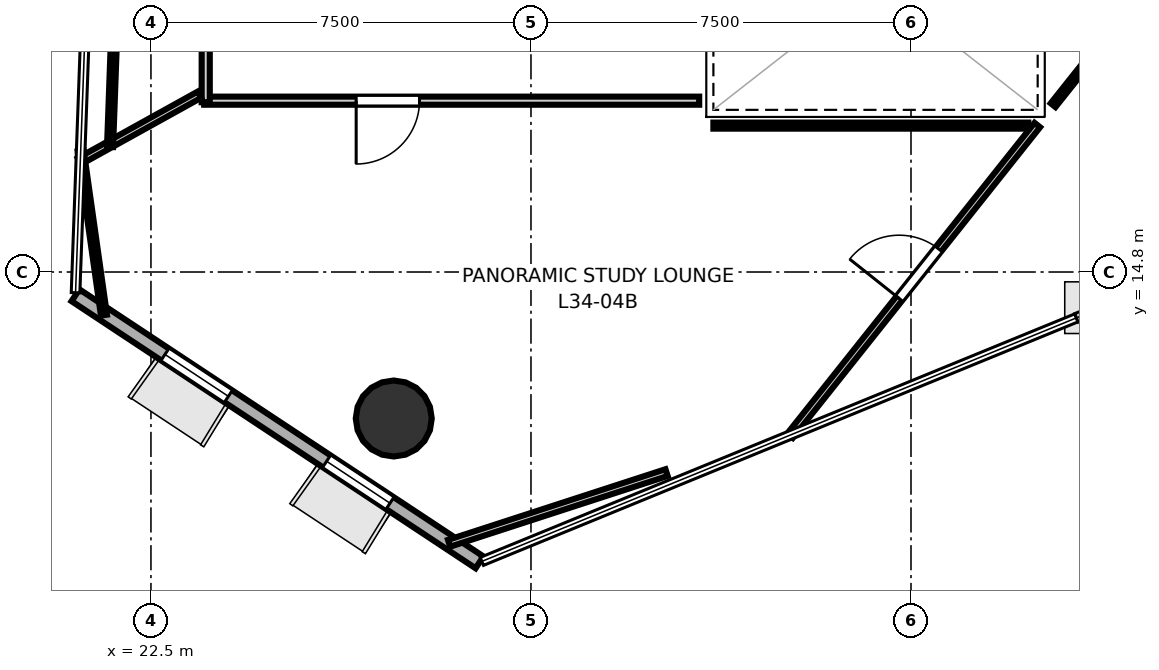
"""IFC4 building model, lengths in metres.
Left out: names, types, materials, properties, quantities, classifications, styles, units other than length and angle.
Written with IfcOpenShell. Run it as: python <this file> out.ifc"""

import sys

from ifc_helpers import new_model, si_unit, direction, frame, frame_2d, origin, origin_2d, place, context, subcontext, project, spatial, rectangle, hollow_circle, extrude, element, fill, save


model = new_model("IFC4")
c1 = context("Model", 3, precision=1e-05, world=origin(), true_north=direction((0.0, 1.0)))
c2 = subcontext(c1, "Body", "Model", "MODEL_VIEW")
j1 = project(units=[si_unit("LENGTHUNIT", "METRE"), si_unit("PLANEANGLEUNIT", "RADIAN")], contexts=[c1])
p1 = place(None, origin())
s1 = spatial("IfcSite", under=j1, at=p1, CompositionType="ELEMENT")
p2 = place(p1, origin())
s2 = spatial("IfcBuilding", under=s1, at=p2, CompositionType="ELEMENT")
p3 = place(p2, frame((0.0, 0.0, 134.8)))
s3 = spatial("IfcBuildingStorey", under=s2, at=p3, CompositionType="ELEMENT", Elevation=134.8)
p4 = place(p3, frame((27.292, 11.909, 0.0), z_axis=(0.0, 0.0, 1.0), x_axis=(1.0, 0.0, 0.0)))
e1 = element("IfcColumn", 1, at=p4, inside=s3, PredefinedType="COLUMN", context=c2, shape_type="SweptSolid", body=[
    extrude(hollow_circle(Radius=0.75, WallThickness=0.036, at=origin_2d()), origin(), (0.0, 0.0, 1.0), 3.7),
])
p5 = place(p3, frame((21.01, 14.341, 0.0), z_axis=(0.0, 0.0, 1.0), x_axis=(0.834216785039, -0.551436628778, 0.0)))
e2 = element("IfcWall", 2, at=p5, inside=s3, PredefinedType="SOLIDWALL", context=c2, shape_type="SweptSolid", body=[
    extrude(rectangle(XDim=9.559, YDim=0.28, at=frame_2d((4.78, 0.0))), origin(), (0.0, 0.0, 1.0), 3.4),
])
p6 = place(p5, frame((2.118, 0.0, 0.85)))
e3 = element("IfcOpeningElement", 3, at=p6, cuts=e2, PredefinedType="OPENING", context=c2, shape_type="SweptSolid", body=[
    extrude(rectangle(XDim=1.5, YDim=2.1, at=frame_2d((0.75, 1.05))), frame((0.0, 0.15, 0.0), z_axis=(0.0, -1.0, 0.0), x_axis=(1.0, 0.0, 0.0)), (0.0, 0.0, 1.0), 0.3),
])
p7 = place(p5, frame((5.941, 0.0, 0.85)))
e4 = element("IfcOpeningElement", 4, at=p7, cuts=e2, PredefinedType="OPENING", context=c2, shape_type="SweptSolid", body=[
    extrude(rectangle(XDim=1.5, YDim=2.1, at=frame_2d((0.75, 1.05))), frame((0.0, 0.15, 0.0), z_axis=(0.0, -1.0, 0.0), x_axis=(1.0, 0.0, 0.0)), (0.0, 0.0, 1.0), 0.3),
])
p8 = place(p3, frame((33.32, 18.181, 0.0), z_axis=(0.0, 0.0, 1.0), x_axis=(-1.0, 0.0, 0.0)))
e5 = element("IfcWall", 5, at=p8, inside=s3, PredefinedType="PARTITIONING", context=c2, shape_type="SweptSolid", body=[
    extrude(rectangle(XDim=9.77, YDim=0.16, at=frame_2d((4.885, 0.0))), origin(), (0.0, 0.0, 1.0), 2.72),
])
p9 = place(p8, frame((5.52, 0.0, 0.0)))
e6 = element("IfcOpeningElement", 6, at=p9, cuts=e5, PredefinedType="OPENING", context=c2, shape_type="SweptSolid", body=[
    extrude(rectangle(XDim=1.25, YDim=2.2, at=frame_2d((0.625, 1.1))), frame((0.0, 0.09, 0.0), z_axis=(0.0, -1.0, 0.0), x_axis=(1.0, 0.0, 0.0)), (0.0, 0.0, 1.0), 0.18),
])
p10 = place(p3, frame((23.581, 18.15, 0.0), z_axis=(0.0, 0.0, 1.0), x_axis=(0.0, 1.0, 0.0)))
e7 = element("IfcWall", 7, at=p10, inside=s3, PredefinedType="PARTITIONING", context=c2, shape_type="SweptSolid", body=[
    extrude(rectangle(XDim=8.575, YDim=0.16, at=frame_2d((4.288, 0.0))), origin(), (0.0, 0.0, 1.0), 2.72),
])
p11 = place(p10, frame((3.663, 0.0, 0.0)))
e8 = element("IfcOpeningElement", 8, at=p11, cuts=e7, PredefinedType="OPENING", context=c2, shape_type="SweptSolid", body=[
    extrude(rectangle(XDim=1.25, YDim=2.2, at=frame_2d((0.625, 1.1))), frame((0.0, 0.09, 0.0), z_axis=(0.0, -1.0, 0.0), x_axis=(1.0, 0.0, 0.0)), (0.0, 0.0, 1.0), 0.18),
])
p12 = place(p3, frame((23.455, 18.298, 0.0), z_axis=(0.0, 0.0, 1.0), x_axis=(-0.874671872236, -0.484715499977, 0.0)))
e9 = element("IfcWall", 9, at=p12, inside=s3, PredefinedType="PARTITIONING", context=c2, shape_type="SweptSolid", body=[
    extrude(rectangle(XDim=2.705, YDim=0.14, at=frame_2d((1.353, 0.0))), origin(), (0.0, 0.0, 1.0), 2.72),
])
p13 = place(p3, frame((21.693, 17.268, 0.0), z_axis=(0.0, 0.0, 1.0), x_axis=(0.036303985609, 0.999340793038, 0.0)))
e10 = element("IfcWall", 10, at=p13, inside=s3, PredefinedType="PARTITIONING", context=c2, shape_type="SweptSolid", body=[
    extrude(rectangle(XDim=9.953, YDim=0.12, at=frame_2d((4.977, 0.0))), origin(), (0.0, 0.0, 1.0), 2.72),
])
p14 = place(p3, frame((40.304, 18.092, 0.0), z_axis=(0.0, 0.0, 1.0), x_axis=(0.622687180488, 0.782470878216, 0.0)))
e11 = element("IfcWall", 11, at=p14, inside=s3, PredefinedType="PARTITIONING", context=c2, shape_type="SweptSolid", body=[
    extrude(rectangle(XDim=5.047, YDim=0.12, at=frame_2d((2.523, 0.0))), origin(), (0.0, 0.0, 1.0), 2.72),
])
p15 = place(p3, frame((35.114, 11.57, 0.0), z_axis=(0.0, 0.0, 1.0), x_axis=(0.622682737299, 0.782474414067, 0.0)))
e12 = element("IfcWall", 12, at=p15, inside=s3, PredefinedType="PARTITIONING", context=c2, shape_type="SweptSolid", body=[
    extrude(rectangle(XDim=7.835, YDim=0.14, at=frame_2d((3.917, 0.0))), origin(), (0.0, 0.0, 1.0), 2.72),
])
p16 = place(p15, frame((3.459, 0.0, 0.0)))
e13 = element("IfcOpeningElement", 13, at=p16, cuts=e12, PredefinedType="OPENING", context=c2, shape_type="SweptSolid", body=[
    extrude(rectangle(XDim=1.25, YDim=2.2, at=frame_2d((0.625, 1.1))), frame((0.0, 0.08, 0.0), z_axis=(0.0, -1.0, 0.0), x_axis=(1.0, 0.0, 0.0)), (0.0, 0.0, 1.0), 0.16),
])
p17 = place(p3, frame((21.572, 13.949, 0.0), z_axis=(0.0, 0.0, 1.0), x_axis=(-0.140136959189, 0.990132128895, 0.0)))
e14 = element("IfcWall", 14, at=p17, inside=s3, PredefinedType="PARTITIONING", context=c2, shape_type="SweptSolid", body=[
    extrude(rectangle(XDim=3.273, YDim=0.12, at=frame_2d((1.637, 0.0))), origin(), (0.0, 0.0, 1.0), 2.72),
])
p18 = place(p3, frame((33.6, 17.689, 0.0), z_axis=(0.0, 0.0, 1.0), x_axis=(1.0, 0.0, 0.0)))
e15 = element("IfcWall", 15, at=p18, inside=s3, PredefinedType="PARTITIONING", context=c2, shape_type="SweptSolid", body=[
    extrude(rectangle(XDim=6.215, YDim=0.12, at=frame_2d((3.107, 0.0))), origin(), (0.0, 0.0, 1.0), 2.72),
])
p19 = place(p3, frame((32.676, 10.842, 0.0), z_axis=(0.0, 0.0, 1.0), x_axis=(-0.951031683132, -0.309093412546, 0.0)))
e16 = element("IfcWall", 16, at=p19, inside=s3, PredefinedType="PARTITIONING", context=c2, shape_type="SweptSolid", body=[
    extrude(rectangle(XDim=4.512, YDim=0.14, at=frame_2d((2.256, 0.0))), origin(), (0.0, 0.0, 1.0), 2.72),
])
p20 = place(p9, origin())
e17 = element("IfcDoor", 17, at=p20, inside=s3, OperationType="SINGLE_SWING_RIGHT", PredefinedType="DOOR", context=c2, shape_type="SweptSolid", body=[
    extrude(rectangle(XDim=1.25, YDim=2.2, at=frame_2d((0.625, 1.1))), frame((0.0, 0.025, 0.0), z_axis=(0.0, -1.0, 0.0), x_axis=(1.0, 0.0, 0.0)), (0.0, 0.0, 1.0), 0.05),
])
fill(e6, e17)
p21 = place(p16, origin())
e18 = element("IfcDoor", 18, at=p21, inside=s3, OperationType="SINGLE_SWING_LEFT", PredefinedType="DOOR", context=c2, shape_type="SweptSolid", body=[
    extrude(rectangle(XDim=1.25, YDim=2.2, at=frame_2d((0.625, 1.1))), frame((0.0, 0.025, 0.0), z_axis=(0.0, -1.0, 0.0), x_axis=(1.0, 0.0, 0.0)), (0.0, 0.0, 1.0), 0.05),
])
fill(e13, e18)
p22 = place(p6, origin())
e19 = element("IfcWindow", 19, at=p22, inside=s3, PartitioningType="SINGLE_PANEL", PredefinedType="WINDOW", context=c2, shape_type="SweptSolid", body=[
    extrude(rectangle(XDim=1.5, YDim=2.1, at=frame_2d((0.75, 1.05))), frame((0.0, 0.03, 0.0), z_axis=(0.0, -1.0, 0.0), x_axis=(1.0, 0.0, 0.0)), (0.0, 0.0, 1.0), 0.06),
])
fill(e3, e19)
p23 = place(p7, origin())
e20 = element("IfcWindow", 20, at=p23, inside=s3, PartitioningType="SINGLE_PANEL", PredefinedType="WINDOW", context=c2, shape_type="SweptSolid", body=[
    extrude(rectangle(XDim=1.5, YDim=2.1, at=frame_2d((0.75, 1.05))), frame((0.0, 0.03, 0.0), z_axis=(0.0, -1.0, 0.0), x_axis=(1.0, 0.0, 0.0)), (0.0, 0.0, 1.0), 0.06),
])
fill(e4, e20)
save(model, sys.argv[1])
